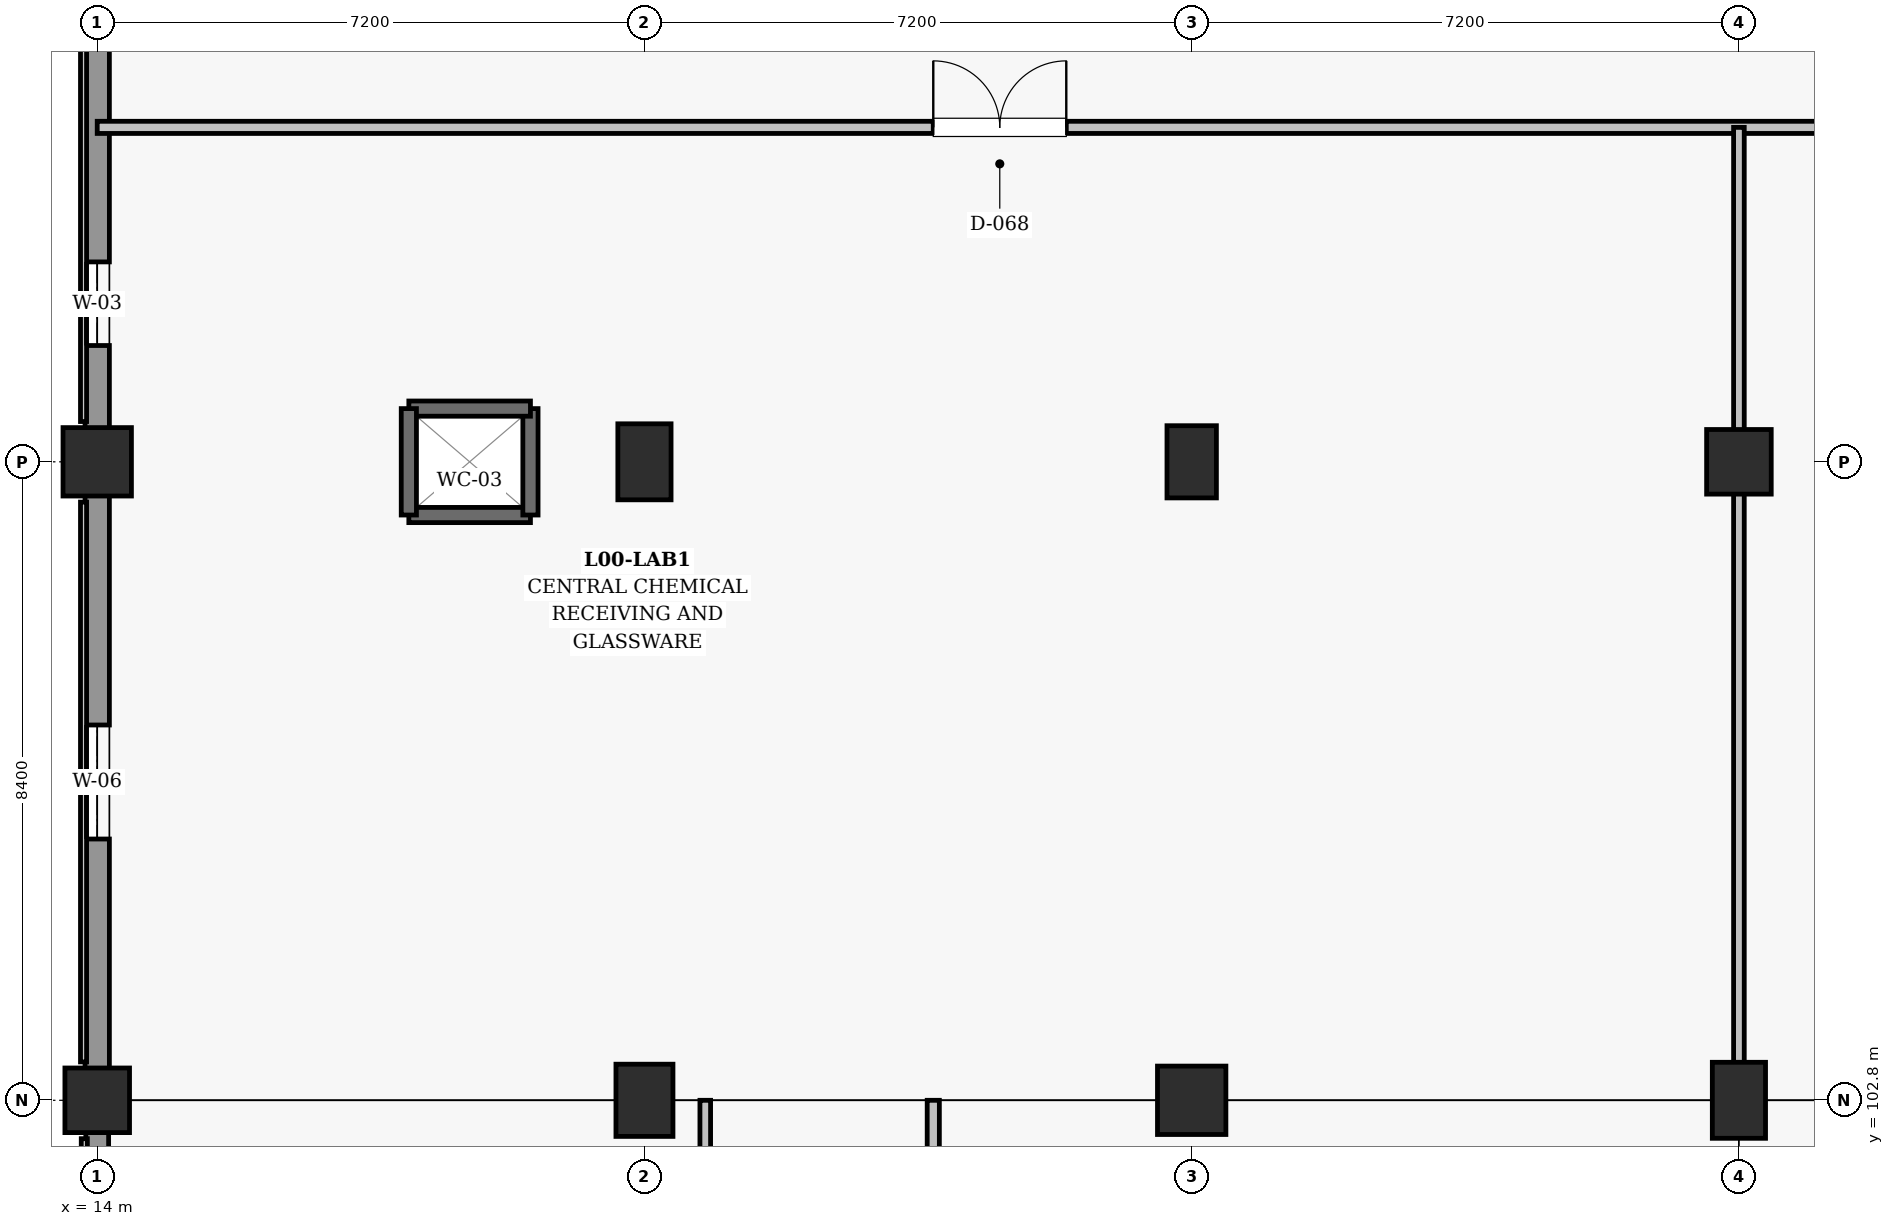
"""IFC4 building model, lengths in metres.
Left out: names, types, materials, properties, quantities, classifications, styles, units other than length and angle.
Written with IfcOpenShell. Run it as: python <this file> out.ifc"""

import sys

from ifc_helpers import new_model, si_unit, direction, frame, frame_2d, origin, origin_2d, place, context, subcontext, project, spatial, rectangle, extrude, element, fill, save


model = new_model("IFC4")
c1 = context("Model", 3, precision=1e-05, world=origin(), true_north=direction((0.0, 1.0)))
c2 = subcontext(c1, "Body", "Model", "MODEL_VIEW")
j1 = project(units=[si_unit("LENGTHUNIT", "METRE"), si_unit("PLANEANGLEUNIT", "RADIAN")], contexts=[c1])
p1 = place(None, origin())
s1 = spatial("IfcSite", under=j1, at=p1, CompositionType="ELEMENT")
p2 = place(p1, origin())
s2 = spatial("IfcBuilding", under=s1, at=p2, CompositionType="ELEMENT")
p3 = place(p2, origin())
s3 = spatial("IfcBuildingStorey", under=s2, at=p3, CompositionType="ELEMENT", Elevation=0.0)
p4 = place(p3, frame((14.0, 102.8, 0.0), z_axis=(0.0, 0.0, 1.0), x_axis=(1.0, 0.0, 0.0)))
e1 = element("IfcColumn", 1, at=p4, inside=s3, PredefinedType="COLUMN", context=c2, shape_type="SweptSolid", body=[
    extrude(rectangle(XDim=0.85, YDim=0.85, at=origin_2d()), origin(), (0.0, 0.0, 1.0), 5.4),
])
p5 = place(p3, frame((14.0, 111.2, 0.0), z_axis=(0.0, 0.0, 1.0), x_axis=(1.0, 0.0, 0.0)))
e2 = element("IfcColumn", 2, at=p5, inside=s3, PredefinedType="COLUMN", context=c2, shape_type="SweptSolid", body=[
    extrude(rectangle(XDim=0.9, YDim=0.9, at=origin_2d()), origin(), (0.0, 0.0, 1.0), 5.4),
])
p6 = place(p3, frame((21.2, 102.8, 0.0), z_axis=(0.0, 0.0, 1.0), x_axis=(1.0, 0.0, 0.0)))
e3 = element("IfcColumn", 3, at=p6, inside=s3, PredefinedType="COLUMN", context=c2, shape_type="SweptSolid", body=[
    extrude(rectangle(XDim=0.75, YDim=0.95, at=origin_2d()), origin(), (0.0, 0.0, 1.0), 5.4),
])
p7 = place(p3, frame((21.2, 111.2, 0.0), z_axis=(0.0, 0.0, 1.0), x_axis=(1.0, 0.0, 0.0)))
e4 = element("IfcColumn", 4, at=p7, inside=s3, PredefinedType="COLUMN", context=c2, shape_type="SweptSolid", body=[
    extrude(rectangle(XDim=0.7, YDim=1.0, at=origin_2d()), origin(), (0.0, 0.0, 1.0), 5.4),
])
p8 = place(p3, frame((28.4, 102.8, 0.0), z_axis=(0.0, 0.0, 1.0), x_axis=(1.0, 0.0, 0.0)))
e5 = element("IfcColumn", 5, at=p8, inside=s3, PredefinedType="COLUMN", context=c2, shape_type="SweptSolid", body=[
    extrude(rectangle(XDim=0.9, YDim=0.9, at=origin_2d()), origin(), (0.0, 0.0, 1.0), 5.4),
])
p9 = place(p3, frame((28.4, 111.2, 0.0), z_axis=(0.0, 0.0, 1.0), x_axis=(1.0, 0.0, 0.0)))
e6 = element("IfcColumn", 6, at=p9, inside=s3, PredefinedType="COLUMN", context=c2, shape_type="SweptSolid", body=[
    extrude(rectangle(XDim=0.65, YDim=0.95, at=origin_2d()), origin(), (0.0, 0.0, 1.0), 5.4),
])
p10 = place(p3, frame((35.6, 102.8, 0.0), z_axis=(0.0, 0.0, 1.0), x_axis=(1.0, 0.0, 0.0)))
e7 = element("IfcColumn", 7, at=p10, inside=s3, PredefinedType="COLUMN", context=c2, shape_type="SweptSolid", body=[
    extrude(rectangle(XDim=0.7, YDim=1.0, at=origin_2d()), origin(), (0.0, 0.0, 1.0), 5.4),
])
p11 = place(p3, frame((35.6, 111.2, 0.0), z_axis=(0.0, 0.0, 1.0), x_axis=(1.0, 0.0, 0.0)))
e8 = element("IfcColumn", 8, at=p11, inside=s3, PredefinedType="COLUMN", context=c2, shape_type="SweptSolid", body=[
    extrude(rectangle(XDim=0.85, YDim=0.85, at=origin_2d()), origin(), (0.0, 0.0, 1.0), 5.4),
])
p12 = place(p3, frame((14.0, 103.205, 0.0), z_axis=(0.0, 0.0, 1.0), x_axis=(0.0, 1.0, 0.0)))
e9 = element("IfcWall", 9, at=p12, inside=s3, PredefinedType="SOLIDWALL", context=c2, shape_type="SweptSolid", body=[
    extrude(rectangle(XDim=7.565, YDim=0.32, at=frame_2d((3.782, 0.0))), origin(), (0.0, 0.0, 1.0), 4.455),
])
p13 = place(p12, frame((3.032, 0.0, 0.95)))
e10 = element("IfcOpeningElement", 10, at=p13, cuts=e9, PredefinedType="OPENING", context=c2, shape_type="SweptSolid", body=[
    extrude(rectangle(XDim=1.5, YDim=2.4, at=frame_2d((0.75, 1.2))), frame((0.0, 0.17, 0.0), z_axis=(0.0, -1.0, 0.0), x_axis=(1.0, 0.0, 0.0)), (0.0, 0.0, 1.0), 0.34),
])
p14 = place(p3, frame((14.0, 111.63, 0.0), z_axis=(0.0, 0.0, 1.0), x_axis=(0.0, 1.0, 0.0)))
e11 = element("IfcWall", 11, at=p14, inside=s3, PredefinedType="SOLIDWALL", context=c2, shape_type="SweptSolid", body=[
    extrude(rectangle(XDim=7.515, YDim=0.32, at=frame_2d((3.758, 0.0))), origin(), (0.0, 0.0, 1.0), 4.455),
])
p15 = place(p14, frame((1.1, 0.0, 0.95)))
e12 = element("IfcOpeningElement", 12, at=p15, cuts=e11, PredefinedType="OPENING", context=c2, shape_type="SweptSolid", body=[
    extrude(rectangle(XDim=1.1, YDim=2.3, at=frame_2d((0.55, 1.15))), frame((0.0, 0.17, 0.0), z_axis=(0.0, -1.0, 0.0), x_axis=(1.0, 0.0, 0.0)), (0.0, 0.0, 1.0), 0.34),
])
p16 = place(p3, frame((14.0, 94.78, 0.0), z_axis=(0.0, 0.0, 1.0), x_axis=(0.0, 1.0, 0.0)))
e13 = element("IfcWall", 13, at=p16, inside=s3, PredefinedType="SOLIDWALL", context=c2, shape_type="SweptSolid", body=[
    extrude(rectangle(XDim=7.615, YDim=0.3, at=frame_2d((3.808, 0.0))), origin(), (0.0, 0.0, 1.0), 4.475),
])
p17 = place(p16, frame((3.008, 0.0, 0.95)))
e14 = element("IfcOpeningElement", 14, at=p17, cuts=e13, PredefinedType="OPENING", context=c2, shape_type="SweptSolid", body=[
    extrude(rectangle(XDim=1.6, YDim=2.5, at=frame_2d((0.8, 1.25))), frame((0.0, 0.16, 0.0), z_axis=(0.0, -1.0, 0.0), x_axis=(1.0, 0.0, 0.0)), (0.0, 0.0, 1.0), 0.32),
])
p18 = place(p3, frame((18.1, 110.5, 0.0), z_axis=(0.0, 0.0, 1.0), x_axis=(1.0, 0.0, 0.0)))
e15 = element("IfcWall", 15, at=p18, inside=s3, PredefinedType="SHEAR", context=c2, shape_type="SweptSolid", body=[
    extrude(rectangle(XDim=1.6, YDim=0.2, at=frame_2d((0.8, 0.0))), origin(), (0.0, 0.0, 1.0), 5.04),
])
p19 = place(p3, frame((19.7, 110.5, 0.0), z_axis=(0.0, 0.0, 1.0), x_axis=(0.0, 1.0, 0.0)))
e16 = element("IfcWall", 16, at=p19, inside=s3, PredefinedType="SHEAR", context=c2, shape_type="SweptSolid", body=[
    extrude(rectangle(XDim=1.4, YDim=0.2, at=frame_2d((0.7, 0.0))), origin(), (0.0, 0.0, 1.0), 5.04),
])
p20 = place(p3, frame((19.7, 111.9, 0.0), z_axis=(0.0, 0.0, 1.0), x_axis=(-1.0, 0.0, 0.0)))
e17 = element("IfcWall", 17, at=p20, inside=s3, PredefinedType="SHEAR", context=c2, shape_type="SweptSolid", body=[
    extrude(rectangle(XDim=1.6, YDim=0.2, at=frame_2d((0.8, 0.0))), origin(), (0.0, 0.0, 1.0), 5.04),
])
p21 = place(p3, frame((18.1, 111.9, 0.0), z_axis=(0.0, 0.0, 1.0), x_axis=(0.0, -1.0, 0.0)))
e18 = element("IfcWall", 18, at=p21, inside=s3, PredefinedType="SHEAR", context=c2, shape_type="SweptSolid", body=[
    extrude(rectangle(XDim=1.4, YDim=0.2, at=frame_2d((0.7, 0.0))), origin(), (0.0, 0.0, 1.0), 5.04),
])
p22 = place(p3, frame((14.0, 115.6, 0.0), z_axis=(0.0, 0.0, 1.0), x_axis=(1.0, 0.0, 0.0)))
e19 = element("IfcWall", 19, at=p22, inside=s3, PredefinedType="PARTITIONING", context=c2, shape_type="SweptSolid", body=[
    extrude(rectangle(XDim=100.8, YDim=0.16, at=frame_2d((50.4, 0.0))), origin(), (0.0, 0.0, 1.0), 3.82),
])
p23 = place(p22, frame((11.0, 0.0, 0.0)))
e20 = element("IfcOpeningElement", 20, at=p23, cuts=e19, PredefinedType="OPENING", context=c2, shape_type="SweptSolid", body=[
    extrude(rectangle(XDim=1.75, YDim=2.25, at=frame_2d((0.875, 1.125))), frame((0.0, 0.09, 0.0), z_axis=(0.0, -1.0, 0.0), x_axis=(1.0, 0.0, 0.0)), (0.0, 0.0, 1.0), 0.18),
])
p24 = place(p22, frame((32.4, 0.0, 0.0)))
e21 = element("IfcOpeningElement", 21, at=p24, cuts=e19, PredefinedType="OPENING", context=c2, shape_type="SweptSolid", body=[
    extrude(rectangle(XDim=1.5, YDim=2.25, at=frame_2d((0.75, 1.125))), frame((0.0, 0.09, 0.0), z_axis=(0.0, -1.0, 0.0), x_axis=(1.0, 0.0, 0.0)), (0.0, 0.0, 1.0), 0.18),
])
p25 = place(p22, frame((54.0, 0.0, 0.0)))
e22 = element("IfcOpeningElement", 22, at=p25, cuts=e19, PredefinedType="OPENING", context=c2, shape_type="SweptSolid", body=[
    extrude(rectangle(XDim=1.5, YDim=2.25, at=frame_2d((0.75, 1.125))), frame((0.0, 0.09, 0.0), z_axis=(0.0, -1.0, 0.0), x_axis=(1.0, 0.0, 0.0)), (0.0, 0.0, 1.0), 0.18),
])
p26 = place(p22, frame((73.8, 0.0, 0.0)))
e23 = element("IfcOpeningElement", 23, at=p26, cuts=e19, PredefinedType="OPENING", context=c2, shape_type="SweptSolid", body=[
    extrude(rectangle(XDim=1.5, YDim=2.25, at=frame_2d((0.75, 1.125))), frame((0.0, 0.09, 0.0), z_axis=(0.0, -1.0, 0.0), x_axis=(1.0, 0.0, 0.0)), (0.0, 0.0, 1.0), 0.18),
])
p27 = place(p22, frame((91.6, 0.0, 0.0)))
e24 = element("IfcOpeningElement", 24, at=p27, cuts=e19, PredefinedType="OPENING", context=c2, shape_type="SweptSolid", body=[
    extrude(rectangle(XDim=1.6, YDim=2.25, at=frame_2d((0.8, 1.125))), frame((0.0, 0.09, 0.0), z_axis=(0.0, -1.0, 0.0), x_axis=(1.0, 0.0, 0.0)), (0.0, 0.0, 1.0), 0.18),
])
p28 = place(p3, frame((35.6, 102.8, 0.0), z_axis=(0.0, 0.0, 1.0), x_axis=(0.0, 1.0, 0.0)))
e25 = element("IfcWall", 25, at=p28, inside=s3, PredefinedType="PARTITIONING", context=c2, shape_type="SweptSolid", body=[
    extrude(rectangle(XDim=12.8, YDim=0.14, at=frame_2d((6.4, 0.0))), origin(), (0.0, 0.0, 1.0), 3.86),
])
p29 = place(p3, frame((25.0, 36.0, 0.0), z_axis=(0.0, 0.0, 1.0), x_axis=(0.0, 1.0, 0.0)))
e26 = element("IfcWall", 26, at=p29, inside=s3, PredefinedType="PARTITIONING", context=c2, shape_type="SweptSolid", body=[
    extrude(rectangle(XDim=66.8, YDim=0.16, at=frame_2d((33.4, 0.0))), origin(), (0.0, 0.0, 1.0), 4.28),
])
p30 = place(p29, frame((9.0, 0.0, 0.0)))
e27 = element("IfcOpeningElement", 27, at=p30, cuts=e26, PredefinedType="OPENING", context=c2, shape_type="SweptSolid", body=[
    extrude(rectangle(XDim=1.25, YDim=2.2, at=frame_2d((0.625, 1.1))), frame((0.0, 0.09, 0.0), z_axis=(0.0, -1.0, 0.0), x_axis=(1.0, 0.0, 0.0)), (0.0, 0.0, 1.0), 0.18),
])
p31 = place(p29, frame((29.0, 0.0, 0.0)))
e28 = element("IfcOpeningElement", 28, at=p31, cuts=e26, PredefinedType="OPENING", context=c2, shape_type="SweptSolid", body=[
    extrude(rectangle(XDim=1.35, YDim=2.2, at=frame_2d((0.675, 1.1))), frame((0.0, 0.09, 0.0), z_axis=(0.0, -1.0, 0.0), x_axis=(1.0, 0.0, 0.0)), (0.0, 0.0, 1.0), 0.18),
])
p32 = place(p29, frame((46.0, 0.0, 0.0)))
e29 = element("IfcOpeningElement", 29, at=p32, cuts=e26, PredefinedType="OPENING", context=c2, shape_type="SweptSolid", body=[
    extrude(rectangle(XDim=1.0, YDim=2.15, at=frame_2d((0.5, 1.075))), frame((0.0, 0.09, 0.0), z_axis=(0.0, -1.0, 0.0), x_axis=(1.0, 0.0, 0.0)), (0.0, 0.0, 1.0), 0.18),
])
p33 = place(p29, frame((59.2, 0.0, 0.0)))
e30 = element("IfcOpeningElement", 30, at=p33, cuts=e26, PredefinedType="OPENING", context=c2, shape_type="SweptSolid", body=[
    extrude(rectangle(XDim=1.1, YDim=2.15, at=frame_2d((0.55, 1.075))), frame((0.0, 0.09, 0.0), z_axis=(0.0, -1.0, 0.0), x_axis=(1.0, 0.0, 0.0)), (0.0, 0.0, 1.0), 0.18),
])
p34 = place(p3, frame((22.0, 63.2, 0.0), z_axis=(0.0, 0.0, 1.0), x_axis=(0.0, 1.0, 0.0)))
e31 = element("IfcWall", 31, at=p34, inside=s3, PredefinedType="PARTITIONING", context=c2, shape_type="SweptSolid", body=[
    extrude(rectangle(XDim=39.6, YDim=0.14, at=frame_2d((19.8, 0.0))), origin(), (0.0, 0.0, 1.0), 4.28),
])
p35 = place(p34, frame((11.3, 0.0, 0.0)))
e32 = element("IfcOpeningElement", 32, at=p35, cuts=e31, PredefinedType="OPENING", context=c2, shape_type="SweptSolid", body=[
    extrude(rectangle(XDim=1.0, YDim=2.15, at=frame_2d((0.5, 1.075))), frame((0.0, 0.08, 0.0), z_axis=(0.0, -1.0, 0.0), x_axis=(1.0, 0.0, 0.0)), (0.0, 0.0, 1.0), 0.16),
])
p36 = place(p34, frame((26.3, 0.0, 0.0)))
e33 = element("IfcOpeningElement", 33, at=p36, cuts=e31, PredefinedType="OPENING", context=c2, shape_type="SweptSolid", body=[
    extrude(rectangle(XDim=1.1, YDim=2.15, at=frame_2d((0.55, 1.075))), frame((0.0, 0.08, 0.0), z_axis=(0.0, -1.0, 0.0), x_axis=(1.0, 0.0, 0.0)), (0.0, 0.0, 1.0), 0.16),
])
p37 = place(p13, origin())
e34 = element("IfcWindow", 34, at=p37, inside=s3, PartitioningType="SINGLE_PANEL", PredefinedType="WINDOW", context=c2, shape_type="SweptSolid", body=[
    extrude(rectangle(XDim=1.5, YDim=2.4, at=frame_2d((0.75, 1.2))), frame((0.0, 0.03, 0.0), z_axis=(0.0, -1.0, 0.0), x_axis=(1.0, 0.0, 0.0)), (0.0, 0.0, 1.0), 0.06),
])
fill(e10, e34)
p38 = place(p15, origin())
e35 = element("IfcWindow", 35, at=p38, inside=s3, PartitioningType="SINGLE_PANEL", PredefinedType="WINDOW", context=c2, shape_type="SweptSolid", body=[
    extrude(rectangle(XDim=1.1, YDim=2.3, at=frame_2d((0.55, 1.15))), frame((0.0, 0.03, 0.0), z_axis=(0.0, -1.0, 0.0), x_axis=(1.0, 0.0, 0.0)), (0.0, 0.0, 1.0), 0.06),
])
fill(e12, e35)
p39 = place(p23, origin())
e36 = element("IfcDoor", 36, at=p39, inside=s3, OperationType="DOUBLE_DOOR_SINGLE_SWING", PredefinedType="DOOR", context=c2, shape_type="SweptSolid", body=[
    extrude(rectangle(XDim=1.75, YDim=2.25, at=frame_2d((0.875, 1.125))), frame((0.0, 0.025, 0.0), z_axis=(0.0, -1.0, 0.0), x_axis=(1.0, 0.0, 0.0)), (0.0, 0.0, 1.0), 0.05),
])
fill(e20, e36)
save(model, sys.argv[1])
